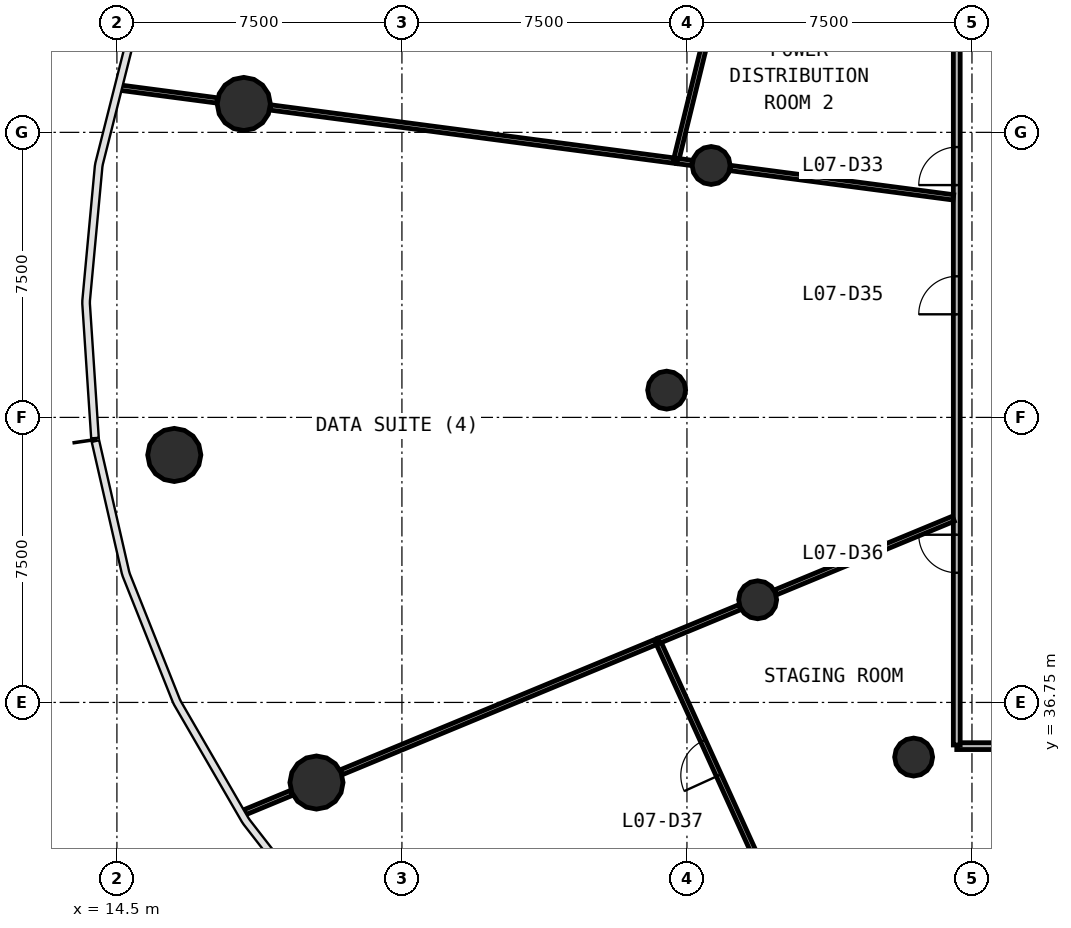
"""IFC4 building model, lengths in metres.
Left out: names, types, materials, properties, quantities, classifications, styles, units other than length and angle.
Written with IfcOpenShell. Run it as: python <this file> out.ifc"""

import sys

from ifc_helpers import new_model, si_unit, direction, frame, frame_2d, origin, origin_2d, place, context, subcontext, project, spatial, rectangle, circle, extrude, source, transform, mapped, element, fill, save


model = new_model("IFC4")
c1 = context("Model", 3, precision=1e-05, world=origin(), true_north=direction((0.0, 1.0)))
c2 = subcontext(c1, "Body", "Model", "MODEL_VIEW")
j1 = project(units=[si_unit("LENGTHUNIT", "METRE"), si_unit("PLANEANGLEUNIT", "RADIAN")], contexts=[c1])
p1 = place(None, origin())
s1 = spatial("IfcSite", under=j1, at=p1, CompositionType="ELEMENT")
p2 = place(p1, origin())
s2 = spatial("IfcBuilding", under=s1, at=p2, CompositionType="ELEMENT")
p3 = place(p2, frame((0.0, 0.0, 31.4)))
s3 = spatial("IfcBuildingStorey", under=s2, at=p3, CompositionType="ELEMENT", Elevation=31.4)
m1 = source(origin(), c2, "Body", "SweptSolid", [
    extrude(circle(Radius=0.7, at=origin_2d()), origin(), (0.0, 0.0, 1.0), 4.4),
])
for number, where, z_axis, x_axis in (
    (1, (17.839, 52.497, 0.0), (0.0, 0.0, 1.0), (1.0, 0.0, 0.0)),
    (2, (16.01, 43.262, 0.0), (0.0, 0.0, 1.0), (1.0, 0.0, 0.0)),
    (3, (19.751, 34.642, 0.0), (0.0, 0.0, 1.0), (1.0, 0.0, 0.0)),
):
    element("IfcColumn", number, at=place(p3, frame(where, z_axis=z_axis, x_axis=x_axis)), inside=s3, PredefinedType="COLUMN", context=c2, shape_type="MappedRepresentation", body=[
        mapped(m1, transform((0.0, 0.0, 0.0), scale=1.0)),
    ])
m2 = source(origin(), c2, "Body", "SweptSolid", [
    extrude(circle(Radius=0.5, at=origin_2d()), origin(), (0.0, 0.0, 1.0), 4.4),
])
for number, where, z_axis, x_axis in (
    (4, (30.137, 50.878, 0.0), (0.0, 0.0, 1.0), (1.0, 0.0, 0.0)),
    (5, (28.966, 44.968, 0.0), (0.0, 0.0, 1.0), (1.0, 0.0, 0.0)),
    (6, (31.361, 39.451, 0.0), (0.0, 0.0, 1.0), (1.0, 0.0, 0.0)),
    (7, (35.465, 35.312, 0.0), (0.0, 0.0, 1.0), (1.0, 0.0, 0.0)),
):
    element("IfcColumn", number, at=place(p3, frame(where, z_axis=z_axis, x_axis=x_axis)), inside=s3, PredefinedType="COLUMN", context=c2, shape_type="MappedRepresentation", body=[
        mapped(m2, transform((0.0, 0.0, 0.0), scale=1.0)),
    ])
p4 = place(p3, frame((67.4, 35.6, 0.0), z_axis=(0.0, 0.0, 1.0), x_axis=(-1.0, 0.0, 0.0)))
e8 = element("IfcWall", 8, at=p4, inside=s3, PredefinedType="PARTITIONING", context=c2, shape_type="SweptSolid", body=[
    extrude(rectangle(XDim=30.8, YDim=0.18, at=frame_2d((15.4, 0.0))), origin(), (0.0, 0.0, 1.0), 3.05),
])
p5 = place(p4, frame((14.95, 0.0, 0.0)))
e9 = element("IfcOpeningElement", 9, at=p5, cuts=e8, PredefinedType="OPENING", context=c2, shape_type="SweptSolid", body=[
    extrude(rectangle(XDim=1.0, YDim=2.1, at=frame_2d((0.5, 1.05))), frame((0.0, 0.1, 0.0), z_axis=(0.0, -1.0, 0.0), x_axis=(1.0, 0.0, 0.0)), (0.0, 0.0, 1.0), 0.2),
])
p6 = place(p4, frame((8.95, 0.0, 0.0)))
e10 = element("IfcOpeningElement", 10, at=p6, cuts=e8, PredefinedType="OPENING", context=c2, shape_type="SweptSolid", body=[
    extrude(rectangle(XDim=1.0, YDim=2.1, at=frame_2d((0.5, 1.05))), frame((0.0, 0.1, 0.0), z_axis=(0.0, -1.0, 0.0), x_axis=(1.0, 0.0, 0.0)), (0.0, 0.0, 1.0), 0.2),
])
p7 = place(p3, frame((36.6, 35.63, 0.0), z_axis=(0.0, 0.0, 1.0), x_axis=(0.0, 1.0, 0.0)))
e11 = element("IfcWall", 11, at=p7, inside=s3, PredefinedType="PARTITIONING", context=c2, shape_type="SweptSolid", body=[
    extrude(rectangle(XDim=23.583, YDim=0.18, at=frame_2d((11.791, 0.0))), origin(), (0.0, 0.0, 1.0), 3.05),
])
p8 = place(p7, frame((14.732, 0.0, 0.0)))
e12 = element("IfcOpeningElement", 12, at=p8, cuts=e11, PredefinedType="OPENING", context=c2, shape_type="SweptSolid", body=[
    extrude(rectangle(XDim=1.0, YDim=2.1, at=frame_2d((0.5, 1.05))), frame((0.0, 0.1, 0.0), z_axis=(0.0, -1.0, 0.0), x_axis=(1.0, 0.0, 0.0)), (0.0, 0.0, 1.0), 0.2),
])
p9 = place(p7, frame((11.333, 0.0, 0.0)))
e13 = element("IfcOpeningElement", 13, at=p9, cuts=e11, PredefinedType="OPENING", context=c2, shape_type="SweptSolid", body=[
    extrude(rectangle(XDim=1.0, YDim=2.1, at=frame_2d((0.5, 1.05))), frame((0.0, 0.1, 0.0), z_axis=(0.0, -1.0, 0.0), x_axis=(1.0, 0.0, 0.0)), (0.0, 0.0, 1.0), 0.2),
])
p10 = place(p7, frame((4.532, 0.0, 0.0)))
e14 = element("IfcOpeningElement", 14, at=p10, cuts=e11, PredefinedType="OPENING", context=c2, shape_type="SweptSolid", body=[
    extrude(rectangle(XDim=1.0, YDim=2.1, at=frame_2d((0.5, 1.05))), frame((0.0, 0.1, 0.0), z_axis=(0.0, -1.0, 0.0), x_axis=(1.0, 0.0, 0.0)), (0.0, 0.0, 1.0), 0.2),
])
p11 = place(p3, frame((29.211, 51.0, 0.0), z_axis=(0.0, 0.0, 1.0), x_axis=(-0.991444412939, 0.130529598373, 0.0)))
e15 = element("IfcWall", 15, at=p11, inside=s3, PredefinedType="PARTITIONING", context=c2, shape_type="SweptSolid", body=[
    extrude(rectangle(XDim=10.766, YDim=0.14, at=frame_2d((5.383, 0.0))), origin(), (0.0, 0.0, 1.0), 3.05),
])
p12 = place(p3, frame((28.733, 38.362, 0.0), z_axis=(0.0, 0.0, 1.0), x_axis=(-0.923883179435, -0.382674627794, 0.0)))
e16 = element("IfcWall", 16, at=p12, inside=s3, PredefinedType="PARTITIONING", context=c2, shape_type="SweptSolid", body=[
    extrude(rectangle(XDim=9.017, YDim=0.14, at=frame_2d((4.508, 0.0))), origin(), (0.0, 0.0, 1.0), 3.05),
])
p13 = place(p3, frame((31.49, 32.299, 0.0), z_axis=(0.0, 0.0, 1.0), x_axis=(-0.413875066619, 0.910333691144, 0.0)))
e17 = element("IfcWall", 17, at=p13, inside=s3, PredefinedType="PARTITIONING", context=c2, shape_type="SweptSolid", body=[
    extrude(rectangle(XDim=6.631, YDim=0.14, at=frame_2d((3.315, 0.0))), origin(), (0.0, 0.0, 1.0), 3.05),
])
p14 = place(p13, frame((2.781, 0.0, 0.0)))
e18 = element("IfcOpeningElement", 18, at=p14, cuts=e17, PredefinedType="OPENING", context=c2, shape_type="SweptSolid", body=[
    extrude(rectangle(XDim=1.0, YDim=2.1, at=frame_2d((0.5, 1.05))), frame((0.0, 0.08, 0.0), z_axis=(0.0, -1.0, 0.0), x_axis=(1.0, 0.0, 0.0)), (0.0, 0.0, 1.0), 0.16),
])
p15 = place(p3, frame((30.637, 56.817, 0.0), z_axis=(0.0, 0.0, 1.0), x_axis=(-0.238166110231, -0.97122443541, 0.0)))
e19 = element("IfcWall", 19, at=p15, inside=s3, PredefinedType="PARTITIONING", context=c2, shape_type="SweptSolid", body=[
    extrude(rectangle(XDim=5.959, YDim=0.14, at=frame_2d((2.979, 0.0))), origin(), (0.0, 0.0, 1.0), 3.05),
])
p16 = place(p3, frame((36.51, 50.039, 0.0), z_axis=(0.0, 0.0, 1.0), x_axis=(-0.991445034615, 0.130524876315, 0.0)))
e20 = element("IfcWall", 20, at=p16, inside=s3, PredefinedType="PARTITIONING", context=c2, shape_type="SweptSolid", body=[
    extrude(rectangle(XDim=5.924, YDim=0.14, at=frame_2d((2.962, 0.0))), origin(), (0.0, 0.0, 1.0), 3.05),
])
p17 = place(p3, frame((36.51, 41.584, 0.0), z_axis=(0.0, 0.0, 1.0), x_axis=(-0.923890025086, -0.382658100067, 0.0)))
e21 = element("IfcWall", 21, at=p17, inside=s3, PredefinedType="PARTITIONING", context=c2, shape_type="SweptSolid", body=[
    extrude(rectangle(XDim=5.068, YDim=0.14, at=frame_2d((2.534, 0.0))), origin(), (0.0, 0.0, 1.0), 3.05),
])
p18 = place(p3, frame((17.141, 52.589, 0.0), z_axis=(0.0, 0.0, 1.0), x_axis=(-0.991441410766, 0.130552399509, 0.0)))
e22 = element("IfcWall", 22, at=p18, inside=s3, PredefinedType="PARTITIONING", context=c2, shape_type="SweptSolid", body=[
    extrude(rectangle(XDim=2.581, YDim=0.14, at=frame_2d((1.29, 0.0))), origin(), (0.0, 0.0, 1.0), 3.05),
])
p19 = place(p3, frame((30.894, 39.258, 0.0), z_axis=(0.0, 0.0, 1.0), x_axis=(-0.923850624014, -0.382753216196, 0.0)))
e23 = element("IfcWall", 23, at=p19, inside=s3, PredefinedType="PARTITIONING", context=c2, shape_type="SweptSolid", body=[
    extrude(rectangle(XDim=2.31, YDim=0.14, at=frame_2d((1.155, 0.0))), origin(), (0.0, 0.0, 1.0), 3.05),
])
p20 = place(p3, frame((19.1, 34.372, 0.0), z_axis=(0.0, 0.0, 1.0), x_axis=(-0.923887406181, -0.382664423091, 0.0)))
e24 = element("IfcWall", 24, at=p20, inside=s3, PredefinedType="PARTITIONING", context=c2, shape_type="SweptSolid", body=[
    extrude(rectangle(XDim=1.333, YDim=0.14, at=frame_2d((0.667, 0.0))), origin(), (0.0, 0.0, 1.0), 3.05),
])
p21 = place(p3, frame((29.637, 50.944, 0.0), z_axis=(0.0, 0.0, 1.0), x_axis=(-0.991418913515, 0.130723134622, 0.0)))
e25 = element("IfcWall", 25, at=p21, inside=s3, PredefinedType="PARTITIONING", context=c2, shape_type="SweptSolid", body=[
    extrude(rectangle(XDim=0.4, YDim=0.14, at=frame_2d((0.2, 0.0))), origin(), (0.0, 0.0, 1.0), 3.05),
])
m3 = source(origin(), c2, "Body", "SweptSolid", [
    extrude(rectangle(XDim=1.0, YDim=2.1, at=frame_2d((0.5, 1.05))), frame((0.0, 0.025, 0.0), z_axis=(0.0, -1.0, 0.0), x_axis=(1.0, 0.0, 0.0)), (0.0, 0.0, 1.0), 0.05),
])
p22 = place(p8, origin())
e26 = element("IfcDoor", 26, at=p22, inside=s3, OperationType="SINGLE_SWING_LEFT", PredefinedType="DOOR", context=c2, shape_type="MappedRepresentation", body=[
    mapped(m3, transform((0.0, 0.0, 0.0), scale=1.0)),
])
fill(e12, e26)
p23 = place(p9, origin())
e27 = element("IfcDoor", 27, at=p23, inside=s3, OperationType="SINGLE_SWING_LEFT", PredefinedType="DOOR", context=c2, shape_type="MappedRepresentation", body=[
    mapped(m3, transform((0.0, 0.0, 0.0), scale=1.0)),
])
fill(e13, e27)
p24 = place(p10, origin())
e28 = element("IfcDoor", 28, at=p24, inside=s3, OperationType="SINGLE_SWING_RIGHT", PredefinedType="DOOR", context=c2, shape_type="MappedRepresentation", body=[
    mapped(m3, transform((0.0, 0.0, 0.0), scale=1.0)),
])
fill(e14, e28)
p25 = place(p14, origin())
e29 = element("IfcDoor", 29, at=p25, inside=s3, OperationType="SINGLE_SWING_LEFT", PredefinedType="DOOR", context=c2, shape_type="MappedRepresentation", body=[
    mapped(m3, transform((0.0, 0.0, 0.0), scale=1.0)),
])
fill(e18, e29)
save(model, sys.argv[1])
